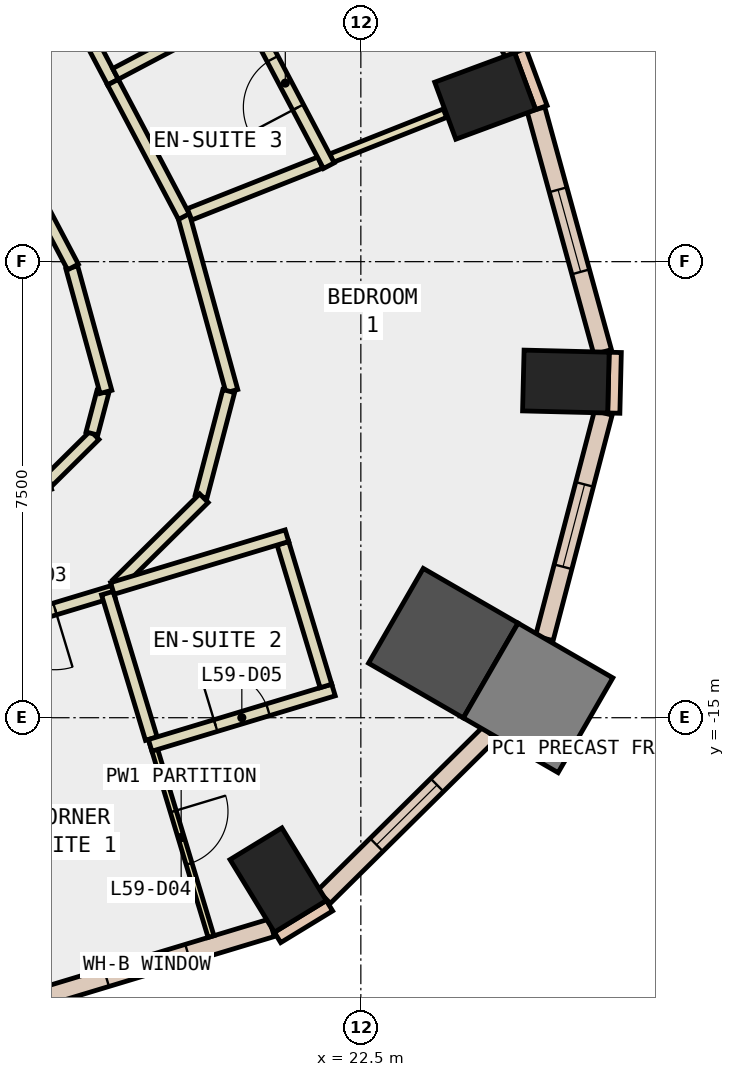
"""IFC4 building model, lengths in metres.
Left out: names, types, materials, properties, quantities, classifications, styles, units other than length and angle.
Written with IfcOpenShell. Run it as: python <this file> out.ifc"""

import sys

from ifc_helpers import new_model, si_unit, direction, frame, frame_2d, origin, origin_2d, place, context, subcontext, project, spatial, rectangle, extrude, element, fill, save


model = new_model("IFC4")
c1 = context("Model", 3, precision=1e-05, world=origin(), true_north=direction((0.0, 1.0)))
c2 = subcontext(c1, "Body", "Model", "MODEL_VIEW")
j1 = project(units=[si_unit("LENGTHUNIT", "METRE"), si_unit("PLANEANGLEUNIT", "RADIAN")], contexts=[c1])
p1 = place(None, origin())
s1 = spatial("IfcSite", under=j1, at=p1, CompositionType="ELEMENT")
p2 = place(p1, origin())
s2 = spatial("IfcBuilding", under=s1, at=p2, CompositionType="ELEMENT")
p3 = place(p2, frame((0.0, 0.0, 259.4)))
s3 = spatial("IfcBuildingStorey", under=s2, at=p3, CompositionType="ELEMENT", Elevation=259.4)
p4 = place(p3, frame((21.14, -17.67, -0.34), z_axis=(0.0, 0.0, 1.0), x_axis=(0.853341581839, 0.521352227103, 0.0)))
e1 = element("IfcColumn", 1, at=p4, inside=s3, PredefinedType="COLUMN", context=c2, shape_type="SweptSolid", body=[
    extrude(rectangle(XDim=1.0, YDim=1.4, at=origin_2d()), origin(), (0.0, 0.0, 1.0), 3.6),
])
p5 = place(p3, frame((23.856, -13.774, -0.34), z_axis=(0.0, 0.0, 1.0), x_axis=(-0.866025403784, 0.5, 0.0)))
e2 = element("IfcColumn", 2, at=p5, inside=s3, PredefinedType="COLUMN", context=c2, shape_type="SweptSolid", body=[
    extrude(rectangle(XDim=1.8, YDim=1.8, at=origin_2d()), origin(), (0.0, 0.0, 1.0), 3.6),
])
for number, where, z_axis, x_axis in (
    (3, (25.872, -9.472, -0.34), (0.0, 0.0, 1.0), (0.025, 1.0, 0.0)),
    (4, (24.545, -4.775, -0.34), (0.0, 0.0, 1.0), (-0.347, 0.938, 0.0)),
):
    element("IfcColumn", number, at=place(p3, frame(where, z_axis=z_axis, x_axis=x_axis)), inside=s3, PredefinedType="COLUMN", context=c2, shape_type="SweptSolid", body=[
        extrude(rectangle(XDim=1.0, YDim=1.4, at=origin_2d()), origin(), (0.0, 0.0, 1.0), 3.6),
    ])
p6 = place(p3, frame((25.415, -14.674, -0.34), z_axis=(0.0, 0.0, 1.0), x_axis=(-0.866025403784, 0.5, 0.0)))
e5 = element("IfcColumn", 5, at=p6, inside=s3, PredefinedType="COLUMN", context=c2, shape_type="SweptSolid", body=[
    extrude(rectangle(XDim=1.8, YDim=1.8, at=origin_2d()), origin(), (0.0, 0.0, 1.0), 3.6),
])
p7 = place(p3, frame((25.469, -4.967, 0.0), z_axis=(0.0, 0.0, 1.0), x_axis=(-0.346892928577, 0.937904737222, 0.0)))
e6 = element("IfcWall", 6, at=p7, inside=s3, PredefinedType="STANDARD", context=c2, shape_type="SweptSolid", body=[
    extrude(rectangle(XDim=1.0, YDim=0.2, at=frame_2d((0.5, 0.0))), origin(), (0.0, 0.0, 1.0), 3.26),
])
p8 = place(p3, frame((21.13, -18.613, 0.0), z_axis=(0.0, 0.0, 1.0), x_axis=(0.853679739553, 0.520798331677, 0.0)))
e7 = element("IfcWall", 7, at=p8, inside=s3, PredefinedType="STANDARD", context=c2, shape_type="SweptSolid", body=[
    extrude(rectangle(XDim=1.0, YDim=0.2, at=frame_2d((0.5, 0.0))), origin(), (0.0, 0.0, 1.0), 3.26),
])
p9 = place(p3, frame((26.66, -9.991, 0.0), z_axis=(0.0, 0.0, 1.0), x_axis=(0.024186470916, 0.999707464524, 0.0)))
e8 = element("IfcWall", 8, at=p9, inside=s3, PredefinedType="STANDARD", context=c2, shape_type="SweptSolid", body=[
    extrude(rectangle(XDim=0.999, YDim=0.2, at=frame_2d((0.5, 0.0))), origin(), (0.0, 0.0, 1.0), 3.26),
])
p10 = place(p3, frame((16.936, -19.692, 0.0), z_axis=(0.0, 0.0, 1.0), x_axis=(0.957346168713, 0.288943442997, 0.0)))
e9 = element("IfcWall", 9, at=p10, inside=s3, PredefinedType="STANDARD", context=c2, shape_type="SweptSolid", body=[
    extrude(rectangle(XDim=4.281, YDim=0.3, at=frame_2d((2.14, 0.0))), origin(), (0.0, 0.0, 1.0), 3.26),
])
p11 = place(p10, frame((1.44, 0.0, 0.9)))
e10 = element("IfcOpeningElement", 10, at=p11, cuts=e9, PredefinedType="OPENING", context=c2, shape_type="SweptSolid", body=[
    extrude(rectangle(XDim=1.4, YDim=2.0, at=frame_2d((0.7, 1.0))), frame((0.0, 0.16, 0.0), z_axis=(0.0, -1.0, 0.0), x_axis=(1.0, 0.0, 0.0)), (0.0, 0.0, 1.0), 0.32),
])
p12 = place(p3, frame((21.893, -17.946, 0.0), z_axis=(0.0, 0.0, 1.0), x_axis=(0.71110935557, 0.703081420904, 0.0)))
e11 = element("IfcWall", 11, at=p12, inside=s3, PredefinedType="STANDARD", context=c2, shape_type="SweptSolid", body=[
    extrude(rectangle(XDim=3.832, YDim=0.3, at=frame_2d((1.916, 0.0))), origin(), (0.0, 0.0, 1.0), 3.26),
])
p13 = place(p12, frame((1.216, 0.0, 0.9)))
e12 = element("IfcOpeningElement", 12, at=p13, cuts=e11, PredefinedType="OPENING", context=c2, shape_type="SweptSolid", body=[
    extrude(rectangle(XDim=1.4, YDim=2.0, at=frame_2d((0.7, 1.0))), frame((0.0, 0.16, 0.0), z_axis=(0.0, -1.0, 0.0), x_axis=(1.0, 0.0, 0.0)), (0.0, 0.0, 1.0), 0.32),
])
p14 = place(p3, frame((25.517, -13.695, 0.0), z_axis=(0.0, 0.0, 1.0), x_axis=(0.253248721632, 0.967401201669, 0.0)))
e13 = element("IfcWall", 13, at=p14, inside=s3, PredefinedType="STANDARD", context=c2, shape_type="SweptSolid", body=[
    extrude(rectangle(XDim=3.834, YDim=0.3, at=frame_2d((1.917, 0.0))), origin(), (0.0, 0.0, 1.0), 3.26),
])
p15 = place(p14, frame((1.217, 0.0, 0.9)))
e14 = element("IfcOpeningElement", 14, at=p15, cuts=e13, PredefinedType="OPENING", context=c2, shape_type="SweptSolid", body=[
    extrude(rectangle(XDim=1.4, YDim=2.0, at=frame_2d((0.7, 1.0))), frame((0.0, 0.16, 0.0), z_axis=(0.0, -1.0, 0.0), x_axis=(1.0, 0.0, 0.0)), (0.0, 0.0, 1.0), 0.32),
])
p16 = place(p3, frame((26.477, -8.987, 0.0), z_axis=(0.0, 0.0, 1.0), x_axis=(-0.264924661919, 0.964269113633, 0.0)))
e15 = element("IfcWall", 15, at=p16, inside=s3, PredefinedType="STANDARD", context=c2, shape_type="SweptSolid", body=[
    extrude(rectangle(XDim=4.137, YDim=0.3, at=frame_2d((2.068, 0.0))), origin(), (0.0, 0.0, 1.0), 3.26),
])
p17 = place(p16, frame((1.368, 0.0, 0.9)))
e16 = element("IfcOpeningElement", 16, at=p17, cuts=e15, PredefinedType="OPENING", context=c2, shape_type="SweptSolid", body=[
    extrude(rectangle(XDim=1.4, YDim=2.0, at=frame_2d((0.7, 1.0))), frame((0.0, 0.16, 0.0), z_axis=(0.0, -1.0, 0.0), x_axis=(1.0, 0.0, 0.0)), (0.0, 0.0, 1.0), 0.32),
])
p18 = place(p3, frame((25.012, -4.07, 0.0), z_axis=(0.0, 0.0, 1.0), x_axis=(-0.466663589714, 0.884434900959, 0.0)))
e17 = element("IfcWall", 17, at=p18, inside=s3, PredefinedType="STANDARD", context=c2, shape_type="SweptSolid", body=[
    extrude(rectangle(XDim=5.638, YDim=0.3, at=frame_2d((2.819, 0.0))), origin(), (0.0, 0.0, 1.0), 3.26),
])
p19 = place(p18, frame((0.459, 0.0, 0.9)))
e18 = element("IfcOpeningElement", 18, at=p19, cuts=e17, PredefinedType="OPENING", context=c2, shape_type="SweptSolid", body=[
    extrude(rectangle(XDim=1.9, YDim=2.0, at=frame_2d((0.95, 1.0))), frame((0.0, 0.16, 0.0), z_axis=(0.0, -1.0, 0.0), x_axis=(1.0, 0.0, 0.0)), (0.0, 0.0, 1.0), 0.32),
])
p20 = place(p18, frame((3.278, 0.0, 0.9)))
e19 = element("IfcOpeningElement", 19, at=p20, cuts=e17, PredefinedType="OPENING", context=c2, shape_type="SweptSolid", body=[
    extrude(rectangle(XDim=1.9, YDim=2.0, at=frame_2d((0.95, 1.0))), frame((0.0, 0.16, 0.0), z_axis=(0.0, -1.0, 0.0), x_axis=(1.0, 0.0, 0.0)), (0.0, 0.0, 1.0), 0.32),
])
p21 = place(p3, frame((17.362, -11.106, 0.0), z_axis=(0.0, 0.0, 1.0), x_axis=(0.710859741153, 0.703333795866, 0.0)))
e20 = element("IfcWall", 20, at=p21, inside=s3, PredefinedType="PARTITIONING", context=c2, shape_type="SweptSolid", body=[
    extrude(rectangle(XDim=1.071, YDim=0.2, at=frame_2d((0.535, 0.0))), origin(), (0.0, 0.0, 1.0), 3.26),
])
p22 = place(p3, frame((18.077, -10.326, 0.0), z_axis=(0.0, 0.0, 1.0), x_axis=(0.254782174857, 0.966998471237, 0.0)))
e21 = element("IfcWall", 21, at=p22, inside=s3, PredefinedType="PARTITIONING", context=c2, shape_type="SweptSolid", body=[
    extrude(rectangle(XDim=0.707, YDim=0.2, at=frame_2d((0.354, 0.0))), origin(), (0.0, 0.0, 1.0), 3.26),
])
p23 = place(p3, frame((18.308, -9.642, 0.0), z_axis=(0.0, 0.0, 1.0), x_axis=(-0.264859637197, 0.96428697626, 0.0)))
e22 = element("IfcWall", 22, at=p23, inside=s3, PredefinedType="PARTITIONING", context=c2, shape_type="SweptSolid", body=[
    extrude(rectangle(XDim=2.122, YDim=0.2, at=frame_2d((1.061, 0.0))), origin(), (0.0, 0.0, 1.0), 3.26),
])
p24 = place(p3, frame((17.766, -7.588, 0.0), z_axis=(0.0, 0.0, 1.0), x_axis=(-0.466727344864, 0.884401258228, 0.0)))
e23 = element("IfcWall", 23, at=p24, inside=s3, PredefinedType="PARTITIONING", context=c2, shape_type="SweptSolid", body=[
    extrude(rectangle(XDim=2.205, YDim=0.2, at=frame_2d((1.103, 0.0))), origin(), (0.0, 0.0, 1.0), 3.26),
])
p25 = place(p3, frame((18.427, -12.922, 0.0), z_axis=(0.0, 0.0, 1.0), x_axis=(-0.957336631432, -0.288975040651, 0.0)))
e24 = element("IfcWall", 24, at=p25, inside=s3, PredefinedType="PARTITIONING", context=c2, shape_type="SweptSolid", body=[
    extrude(rectangle(XDim=3.0, YDim=0.2, at=frame_2d((1.5, 0.0))), origin(), (0.0, 0.0, 1.0), 3.26),
])
p26 = place(p25, frame((1.0, 0.0, 0.0)))
e25 = element("IfcOpeningElement", 25, at=p26, cuts=e24, PredefinedType="OPENING", context=c2, shape_type="SweptSolid", body=[
    extrude(rectangle(XDim=1.0, YDim=2.1, at=frame_2d((0.5, 1.05))), frame((0.0, 0.11, 0.0), z_axis=(0.0, -1.0, 0.0), x_axis=(1.0, 0.0, 0.0)), (0.0, 0.0, 1.0), 0.22),
])
p27 = place(p3, frame((19.564, -6.662, 0.0), z_axis=(0.0, 0.0, 1.0), x_axis=(0.264876135597, -0.96428244451, 0.0)))
e26 = element("IfcWall", 26, at=p27, inside=s3, PredefinedType="PARTITIONING", context=c2, shape_type="SweptSolid", body=[
    extrude(rectangle(XDim=3.077, YDim=0.2, at=frame_2d((1.538, 0.0))), origin(), (0.0, 0.0, 1.0), 3.26),
])
p28 = place(p3, frame((20.327, -9.629, 0.0), z_axis=(0.0, 0.0, 1.0), x_axis=(-0.253192482031, -0.967415922467, 0.0)))
e27 = element("IfcWall", 27, at=p28, inside=s3, PredefinedType="PARTITIONING", context=c2, shape_type="SweptSolid", body=[
    extrude(rectangle(XDim=1.792, YDim=0.2, at=frame_2d((0.896, 0.0))), origin(), (0.0, 0.0, 1.0), 3.26),
])
p29 = place(p3, frame((19.919, -11.39, 0.0), z_axis=(0.0, 0.0, 1.0), x_axis=(-0.71104667794, -0.70314480855, 0.0)))
e28 = element("IfcWall", 28, at=p29, inside=s3, PredefinedType="PARTITIONING", context=c2, shape_type="SweptSolid", body=[
    extrude(rectangle(XDim=2.008, YDim=0.2, at=frame_2d((1.004, 0.0))), origin(), (0.0, 0.0, 1.0), 3.26),
])
p30 = place(p3, frame((16.778, -1.429, 0.0), z_axis=(0.0, 0.0, 1.0), x_axis=(0.466493865945, -0.884524433261, 0.0)))
e29 = element("IfcWall", 29, at=p30, inside=s3, PredefinedType="PARTITIONING", context=c2, shape_type="SweptSolid", body=[
    extrude(rectangle(XDim=3.526, YDim=0.2, at=frame_2d((1.763, 0.0))), origin(), (0.0, 0.0, 1.0), 3.26),
])
p31 = place(p30, frame((1.313, 0.0, 0.0)))
e30 = element("IfcOpeningElement", 30, at=p31, cuts=e29, PredefinedType="OPENING", context=c2, shape_type="SweptSolid", body=[
    extrude(rectangle(XDim=1.0, YDim=2.1, at=frame_2d((0.5, 1.05))), frame((0.0, 0.11, 0.0), z_axis=(0.0, -1.0, 0.0), x_axis=(1.0, 0.0, 0.0)), (0.0, 0.0, 1.0), 0.22),
])
p32 = place(p3, frame((18.423, -4.548, 0.0), z_axis=(0.0, 0.0, 1.0), x_axis=(0.466792565793, -0.884366835946, 0.0)))
e31 = element("IfcWall", 31, at=p32, inside=s3, PredefinedType="PARTITIONING", context=c2, shape_type="SweptSolid", body=[
    extrude(rectangle(XDim=2.5, YDim=0.2, at=frame_2d((1.25, 0.0))), origin(), (0.0, 0.0, 1.0), 3.26),
])
p33 = place(p3, frame((19.054, -15.344, 0.0), z_axis=(0.0, 0.0, 1.0), x_axis=(0.288803435252, -0.957388414274, 0.0)))
e32 = element("IfcWall", 32, at=p33, inside=s3, PredefinedType="PARTITIONING", context=c2, shape_type="SweptSolid", body=[
    extrude(rectangle(XDim=3.4, YDim=0.1, at=frame_2d((1.7, 0.0))), origin(), (0.0, 0.0, 1.0), 3.26),
])
p34 = place(p33, frame((1.25, 0.0, 0.0)))
e33 = element("IfcOpeningElement", 33, at=p34, cuts=e32, PredefinedType="OPENING", context=c2, shape_type="SweptSolid", body=[
    extrude(rectangle(XDim=0.9, YDim=2.1, at=frame_2d((0.45, 1.05))), frame((0.0, 0.06, 0.0), z_axis=(0.0, -1.0, 0.0), x_axis=(1.0, 0.0, 0.0)), (0.0, 0.0, 1.0), 0.12),
])
p35 = place(p3, frame((18.331, -12.951, 0.0), z_axis=(0.0, 0.0, 1.0), x_axis=(0.289175152117, -0.957276204341, 0.0)))
e34 = element("IfcWall", 34, at=p35, inside=s3, PredefinedType="PARTITIONING", context=c2, shape_type="SweptSolid", body=[
    extrude(rectangle(XDim=2.5, YDim=0.2, at=frame_2d((1.25, 0.0))), origin(), (0.0, 0.0, 1.0), 3.26),
])
p36 = place(p3, frame((19.035, -15.455, 0.0), z_axis=(0.0, 0.0, 1.0), x_axis=(0.957248369253, 0.28926728049, 0.0)))
e35 = element("IfcWall", 35, at=p36, inside=s3, PredefinedType="PARTITIONING", context=c2, shape_type="SweptSolid", body=[
    extrude(rectangle(XDim=3.15, YDim=0.2, at=frame_2d((1.575, 0.0))), origin(), (0.0, 0.0, 1.0), 3.26),
])
p37 = place(p36, frame((1.125, 0.0, 0.0)))
e36 = element("IfcOpeningElement", 36, at=p37, cuts=e35, PredefinedType="OPENING", context=c2, shape_type="SweptSolid", body=[
    extrude(rectangle(XDim=0.9, YDim=2.1, at=frame_2d((0.45, 1.05))), frame((0.0, 0.11, 0.0), z_axis=(0.0, -1.0, 0.0), x_axis=(1.0, 0.0, 0.0)), (0.0, 0.0, 1.0), 0.22),
])
p38 = place(p3, frame((21.926, -14.478, 0.0), z_axis=(0.0, 0.0, 1.0), x_axis=(-0.288928787246, 0.957350591947, 0.0)))
e37 = element("IfcWall", 37, at=p38, inside=s3, PredefinedType="PARTITIONING", context=c2, shape_type="SweptSolid", body=[
    extrude(rectangle(XDim=2.45, YDim=0.2, at=frame_2d((1.225, 0.0))), origin(), (0.0, 0.0, 1.0), 3.26),
])
p39 = place(p3, frame((21.285, -12.007, 0.0), z_axis=(0.0, 0.0, 1.0), x_axis=(-0.957329834998, -0.288997555392, 0.0)))
e38 = element("IfcWall", 38, at=p39, inside=s3, PredefinedType="PARTITIONING", context=c2, shape_type="SweptSolid", body=[
    extrude(rectangle(XDim=3.0, YDim=0.2, at=frame_2d((1.5, 0.0))), origin(), (0.0, 0.0, 1.0), 3.26),
])
p40 = place(p3, frame((22.02, -5.796, 0.0), z_axis=(0.0, 0.0, 1.0), x_axis=(0.929915172208, 0.367774078066, 0.0)))
e39 = element("IfcWall", 39, at=p40, inside=s3, PredefinedType="PARTITIONING", context=c2, shape_type="SweptSolid", body=[
    extrude(rectangle(XDim=2.003, YDim=0.15, at=frame_2d((1.002, 0.0))), origin(), (0.0, 0.0, 1.0), 3.26),
])
p41 = place(p3, frame((19.683, -6.722, 0.0), z_axis=(0.0, 0.0, 1.0), x_axis=(0.929744903847, 0.368204309821, 0.0)))
e40 = element("IfcWall", 40, at=p41, inside=s3, PredefinedType="PARTITIONING", context=c2, shape_type="SweptSolid", body=[
    extrude(rectangle(XDim=2.313, YDim=0.2, at=frame_2d((1.157, 0.0))), origin(), (0.0, 0.0, 1.0), 3.26),
])
p42 = place(p3, frame((21.974, -5.922, 0.0), z_axis=(0.0, 0.0, 1.0), x_axis=(-0.466401249432, 0.88457327256, 0.0)))
e41 = element("IfcWall", 41, at=p42, inside=s3, PredefinedType="PARTITIONING", context=c2, shape_type="SweptSolid", body=[
    extrude(rectangle(XDim=3.073, YDim=0.2, at=frame_2d((1.536, 0.0))), origin(), (0.0, 0.0, 1.0), 3.26),
])
p43 = place(p42, frame((1.086, 0.0, 0.0)))
e42 = element("IfcOpeningElement", 42, at=p43, cuts=e41, PredefinedType="OPENING", context=c2, shape_type="SweptSolid", body=[
    extrude(rectangle(XDim=0.9, YDim=2.1, at=frame_2d((0.45, 1.05))), frame((0.0, 0.11, 0.0), z_axis=(0.0, -1.0, 0.0), x_axis=(1.0, 0.0, 0.0)), (0.0, 0.0, 1.0), 0.22),
])
p44 = place(p3, frame((20.499, -3.339, 0.0), z_axis=(0.0, 0.0, 1.0), x_axis=(-0.884293452572, -0.466931568583, 0.0)))
e43 = element("IfcWall", 43, at=p44, inside=s3, PredefinedType="PARTITIONING", context=c2, shape_type="SweptSolid", body=[
    extrude(rectangle(XDim=2.3, YDim=0.2, at=frame_2d((1.15, 0.0))), origin(), (0.0, 0.0, 1.0), 3.26),
])
p45 = place(p11, origin())
e44 = element("IfcWindow", 44, at=p45, inside=s3, PartitioningType="SINGLE_PANEL", PredefinedType="WINDOW", context=c2, shape_type="SweptSolid", body=[
    extrude(rectangle(XDim=1.4, YDim=2.0, at=frame_2d((0.7, 1.0))), frame((0.0, 0.03, 0.0), z_axis=(0.0, -1.0, 0.0), x_axis=(1.0, 0.0, 0.0)), (0.0, 0.0, 1.0), 0.06),
])
fill(e10, e44)
p46 = place(p13, origin())
e45 = element("IfcWindow", 45, at=p46, inside=s3, PartitioningType="SINGLE_PANEL", PredefinedType="WINDOW", context=c2, shape_type="SweptSolid", body=[
    extrude(rectangle(XDim=1.4, YDim=2.0, at=frame_2d((0.7, 1.0))), frame((0.0, 0.03, 0.0), z_axis=(0.0, -1.0, 0.0), x_axis=(1.0, 0.0, 0.0)), (0.0, 0.0, 1.0), 0.06),
])
fill(e12, e45)
p47 = place(p15, origin())
e46 = element("IfcWindow", 46, at=p47, inside=s3, PartitioningType="SINGLE_PANEL", PredefinedType="WINDOW", context=c2, shape_type="SweptSolid", body=[
    extrude(rectangle(XDim=1.4, YDim=2.0, at=frame_2d((0.7, 1.0))), frame((0.0, 0.03, 0.0), z_axis=(0.0, -1.0, 0.0), x_axis=(1.0, 0.0, 0.0)), (0.0, 0.0, 1.0), 0.06),
])
fill(e14, e46)
p48 = place(p17, origin())
e47 = element("IfcWindow", 47, at=p48, inside=s3, PartitioningType="SINGLE_PANEL", PredefinedType="WINDOW", context=c2, shape_type="SweptSolid", body=[
    extrude(rectangle(XDim=1.4, YDim=2.0, at=frame_2d((0.7, 1.0))), frame((0.0, 0.03, 0.0), z_axis=(0.0, -1.0, 0.0), x_axis=(1.0, 0.0, 0.0)), (0.0, 0.0, 1.0), 0.06),
])
fill(e16, e47)
p49 = place(p26, origin())
e48 = element("IfcDoor", 48, at=p49, inside=s3, OperationType="SINGLE_SWING_LEFT", PredefinedType="DOOR", context=c2, shape_type="SweptSolid", body=[
    extrude(rectangle(XDim=1.0, YDim=2.1, at=frame_2d((0.5, 1.05))), frame((0.0, 0.025, 0.0), z_axis=(0.0, -1.0, 0.0), x_axis=(1.0, 0.0, 0.0)), (0.0, 0.0, 1.0), 0.05),
])
fill(e25, e48)
p50 = place(p34, origin())
e49 = element("IfcDoor", 49, at=p50, inside=s3, OperationType="SINGLE_SWING_RIGHT", PredefinedType="DOOR", context=c2, shape_type="SweptSolid", body=[
    extrude(rectangle(XDim=0.9, YDim=2.1, at=frame_2d((0.45, 1.05))), frame((0.0, 0.025, 0.0), z_axis=(0.0, -1.0, 0.0), x_axis=(1.0, 0.0, 0.0)), (0.0, 0.0, 1.0), 0.05),
])
fill(e33, e49)
p51 = place(p37, origin())
e50 = element("IfcDoor", 50, at=p51, inside=s3, OperationType="SINGLE_SWING_LEFT", PredefinedType="DOOR", context=c2, shape_type="SweptSolid", body=[
    extrude(rectangle(XDim=0.9, YDim=2.1, at=frame_2d((0.45, 1.05))), frame((0.0, 0.025, 0.0), z_axis=(0.0, -1.0, 0.0), x_axis=(1.0, 0.0, 0.0)), (0.0, 0.0, 1.0), 0.05),
])
fill(e36, e50)
p52 = place(p43, origin())
e51 = element("IfcDoor", 51, at=p52, inside=s3, OperationType="SINGLE_SWING_RIGHT", PredefinedType="DOOR", context=c2, shape_type="SweptSolid", body=[
    extrude(rectangle(XDim=0.9, YDim=2.1, at=frame_2d((0.45, 1.05))), frame((0.0, 0.025, 0.0), z_axis=(0.0, -1.0, 0.0), x_axis=(1.0, 0.0, 0.0)), (0.0, 0.0, 1.0), 0.05),
])
fill(e42, e51)
save(model, sys.argv[1])
